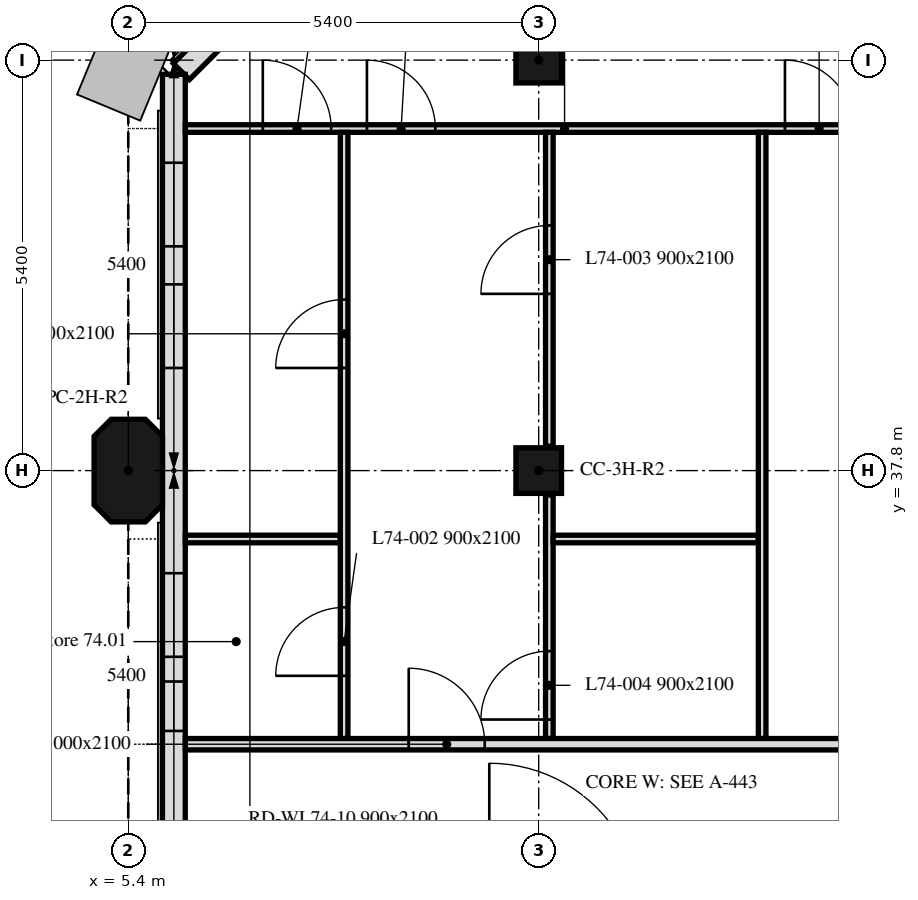
"""IFC4 building model, lengths in metres.
Left out: names, types, materials, properties, quantities, classifications, styles, units other than length and angle.
Written with IfcOpenShell. Run it as: python <this file> out.ifc"""

import sys

from ifc_helpers import new_model, si_unit, direction, frame, frame_2d, origin, origin_2d, place, context, subcontext, project, spatial, polyline, rectangle, outline, extrude, element, fill, save


model = new_model("IFC4")
c1 = context("Model", 3, precision=1e-05, world=origin(), true_north=direction((0.0, 1.0)))
c2 = subcontext(c1, "Body", "Model", "MODEL_VIEW")
j1 = project(units=[si_unit("LENGTHUNIT", "METRE"), si_unit("PLANEANGLEUNIT", "RADIAN")], contexts=[c1])
p1 = place(None, origin())
s1 = spatial("IfcSite", under=j1, at=p1, CompositionType="ELEMENT")
p2 = place(p1, origin())
s2 = spatial("IfcBuilding", under=s1, at=p2, CompositionType="ELEMENT")
p3 = place(p2, frame((0.0, 0.0, 298.3)))
s3 = spatial("IfcBuildingStorey", under=s2, at=p3, CompositionType="ELEMENT", Elevation=298.3)
p4 = place(p3, frame((5.4, 37.8, 0.0), z_axis=(0.0, 0.0, 1.0), x_axis=(0.0, 1.0, 0.0)))
e1 = element("IfcColumn", 1, at=p4, inside=s3, PredefinedType="COLUMN", context=c2, shape_type="SweptSolid", body=[
    extrude(outline(polyline([(-0.45, -0.45), (0.45, -0.45), (0.675, -0.225), (0.675, 0.225), (0.45, 0.45), (-0.45, 0.45), (-0.675, 0.225), (-0.675, -0.225), (-0.45, -0.45)])), origin(), (0.0, 0.0, 1.0), 3.0),
])
for number, where, z_axis, x_axis in (
    (2, (10.8, 37.8, 0.0), (0.0, 0.0, 1.0), (1.0, 0.0, 0.0)),
    (3, (10.8, 43.2, 0.0), (0.0, 0.0, 1.0), (1.0, 0.0, 0.0)),
):
    element("IfcColumn", number, at=place(p3, frame(where, z_axis=z_axis, x_axis=x_axis)), inside=s3, PredefinedType="COLUMN", context=c2, shape_type="SweptSolid", body=[
        extrude(rectangle(XDim=0.6, YDim=0.6, at=origin_2d()), origin(), (0.0, 0.0, 1.0), 3.0),
    ])
p5 = place(p3, frame((10.949, 47.901, 0.0), z_axis=(0.0, 0.0, 1.0), x_axis=(-0.707106781187, -0.707106781187, 0.0)))
e4 = element("IfcWall", 4, at=p5, inside=s3, PredefinedType="SOLIDWALL", context=c2, shape_type="SweptSolid", body=[
    extrude(rectangle(XDim=6.86, YDim=0.3, at=frame_2d((3.43, 0.0))), origin(), (0.0, 0.0, 1.0), 3.0),
])
p6 = place(p5, frame((1.28, 0.0, 0.9)))
e5 = element("IfcOpeningElement", 5, at=p6, cuts=e4, PredefinedType="OPENING", context=c2, shape_type="SweptSolid", body=[
    extrude(rectangle(XDim=1.1, YDim=1.7, at=frame_2d((0.55, 0.85))), frame((0.0, 0.16, 0.0), z_axis=(0.0, -1.0, 0.0), x_axis=(1.0, 0.0, 0.0)), (0.0, 0.0, 1.0), 0.32),
])
p7 = place(p5, frame((4.48, 0.0, 0.9)))
e6 = element("IfcOpeningElement", 6, at=p7, cuts=e4, PredefinedType="OPENING", context=c2, shape_type="SweptSolid", body=[
    extrude(rectangle(XDim=1.1, YDim=1.7, at=frame_2d((0.55, 0.85))), frame((0.0, 0.16, 0.0), z_axis=(0.0, -1.0, 0.0), x_axis=(1.0, 0.0, 0.0)), (0.0, 0.0, 1.0), 0.32),
])
p8 = place(p3, frame((6.0, 43.014, 0.0), z_axis=(0.0, 0.0, 1.0), x_axis=(0.0, -1.0, 0.0)))
e7 = element("IfcWall", 7, at=p8, inside=s3, PredefinedType="SOLIDWALL", context=c2, shape_type="SweptSolid", body=[
    extrude(rectangle(XDim=10.614, YDim=0.3, at=frame_2d((5.307, 0.0))), origin(), (0.0, 0.0, 1.0), 3.0),
])
p9 = place(p8, frame((1.164, 0.0, 0.9)))
e8 = element("IfcOpeningElement", 8, at=p9, cuts=e7, PredefinedType="OPENING", context=c2, shape_type="SweptSolid", body=[
    extrude(rectangle(XDim=1.1, YDim=1.7, at=frame_2d((0.55, 0.85))), frame((0.0, 0.16, 0.0), z_axis=(0.0, -1.0, 0.0), x_axis=(1.0, 0.0, 0.0)), (0.0, 0.0, 1.0), 0.32),
])
p10 = place(p8, frame((2.764, 0.0, 0.9)))
e9 = element("IfcOpeningElement", 9, at=p10, cuts=e7, PredefinedType="OPENING", context=c2, shape_type="SweptSolid", body=[
    extrude(rectangle(XDim=1.1, YDim=1.7, at=frame_2d((0.55, 0.85))), frame((0.0, 0.16, 0.0), z_axis=(0.0, -1.0, 0.0), x_axis=(1.0, 0.0, 0.0)), (0.0, 0.0, 1.0), 0.32),
])
p11 = place(p8, frame((6.564, 0.0, 0.9)))
e10 = element("IfcOpeningElement", 10, at=p11, cuts=e7, PredefinedType="OPENING", context=c2, shape_type="SweptSolid", body=[
    extrude(rectangle(XDim=1.1, YDim=1.7, at=frame_2d((0.55, 0.85))), frame((0.0, 0.16, 0.0), z_axis=(0.0, -1.0, 0.0), x_axis=(1.0, 0.0, 0.0)), (0.0, 0.0, 1.0), 0.32),
])
p12 = place(p8, frame((7.989, 0.0, 0.9)))
e11 = element("IfcOpeningElement", 11, at=p12, cuts=e7, PredefinedType="OPENING", context=c2, shape_type="SweptSolid", body=[
    extrude(rectangle(XDim=0.65, YDim=1.7, at=frame_2d((0.325, 0.85))), frame((0.0, 0.16, 0.0), z_axis=(0.0, -1.0, 0.0), x_axis=(1.0, 0.0, 0.0)), (0.0, 0.0, 1.0), 0.32),
])
p13 = place(p3, frame((6.151, 42.3, 0.0), z_axis=(0.0, 0.0, 1.0), x_axis=(1.0, 0.0, 0.0)))
e12 = element("IfcWall", 12, at=p13, inside=s3, PredefinedType="PARTITIONING", context=c2, shape_type="SweptSolid", body=[
    extrude(rectangle(XDim=9.979, YDim=0.1, at=frame_2d((4.99, 0.0))), origin(), (0.0, 0.0, 1.0), 3.0),
])
p14 = place(p13, frame((7.889, 0.0, 0.0)))
e13 = element("IfcOpeningElement", 13, at=p14, cuts=e12, PredefinedType="OPENING", context=c2, shape_type="SweptSolid", body=[
    extrude(rectangle(XDim=0.9, YDim=2.1, at=frame_2d((0.45, 1.05))), frame((0.0, 0.05, 0.0), z_axis=(0.0, -1.0, 0.0), x_axis=(1.0, 0.0, 0.0)), (0.0, 0.0, 1.0), 0.1),
])
p15 = place(p13, frame((1.019, 0.0, 0.0)))
e14 = element("IfcOpeningElement", 14, at=p15, cuts=e12, PredefinedType="OPENING", context=c2, shape_type="SweptSolid", body=[
    extrude(rectangle(XDim=0.9, YDim=2.1, at=frame_2d((0.45, 1.05))), frame((0.0, 0.05, 0.0), z_axis=(0.0, -1.0, 0.0), x_axis=(1.0, 0.0, 0.0)), (0.0, 0.0, 1.0), 0.1),
])
p16 = place(p13, frame((2.389, 0.0, 0.0)))
e15 = element("IfcOpeningElement", 15, at=p16, cuts=e12, PredefinedType="OPENING", context=c2, shape_type="SweptSolid", body=[
    extrude(rectangle(XDim=0.9, YDim=2.1, at=frame_2d((0.45, 1.05))), frame((0.0, 0.05, 0.0), z_axis=(0.0, -1.0, 0.0), x_axis=(1.0, 0.0, 0.0)), (0.0, 0.0, 1.0), 0.1),
])
p17 = place(p3, frame((6.151, 36.9, 0.0), z_axis=(0.0, 0.0, 1.0), x_axis=(1.0, 0.0, 0.0)))
e16 = element("IfcWall", 16, at=p17, inside=s3, PredefinedType="PARTITIONING", context=c2, shape_type="SweptSolid", body=[
    extrude(rectangle(XDim=2.039, YDim=0.1, at=frame_2d((1.02, 0.0))), origin(), (0.0, 0.0, 1.0), 3.0),
])
p18 = place(p3, frame((8.24, 34.275, 0.0), z_axis=(0.0, 0.0, 1.0), x_axis=(0.0, 1.0, 0.0)))
e17 = element("IfcWall", 17, at=p18, inside=s3, PredefinedType="PARTITIONING", context=c2, shape_type="SweptSolid", body=[
    extrude(rectangle(XDim=7.975, YDim=0.1, at=frame_2d((3.988, 0.0))), origin(), (0.0, 0.0, 1.0), 3.0),
])
p19 = place(p18, frame((0.825, 0.0, 0.0)))
e18 = element("IfcOpeningElement", 18, at=p19, cuts=e17, PredefinedType="OPENING", context=c2, shape_type="SweptSolid", body=[
    extrude(rectangle(XDim=0.9, YDim=2.1, at=frame_2d((0.45, 1.05))), frame((0.0, 0.05, 0.0), z_axis=(0.0, -1.0, 0.0), x_axis=(1.0, 0.0, 0.0)), (0.0, 0.0, 1.0), 0.1),
])
p20 = place(p18, frame((4.875, 0.0, 0.0)))
e19 = element("IfcOpeningElement", 19, at=p20, cuts=e17, PredefinedType="OPENING", context=c2, shape_type="SweptSolid", body=[
    extrude(rectangle(XDim=0.9, YDim=2.1, at=frame_2d((0.45, 1.05))), frame((0.0, 0.05, 0.0), z_axis=(0.0, -1.0, 0.0), x_axis=(1.0, 0.0, 0.0)), (0.0, 0.0, 1.0), 0.1),
])
p21 = place(p3, frame((10.94, 34.275, 0.0), z_axis=(0.0, 0.0, 1.0), x_axis=(0.0, 1.0, 0.0)))
e20 = element("IfcWall", 20, at=p21, inside=s3, PredefinedType="PARTITIONING", context=c2, shape_type="SweptSolid", body=[
    extrude(rectangle(XDim=3.205, YDim=0.1, at=frame_2d((1.603, 0.0))), origin(), (0.0, 0.0, 1.0), 3.0),
])
p22 = place(p21, frame((0.25, 0.0, 0.0)))
e21 = element("IfcOpeningElement", 21, at=p22, cuts=e20, PredefinedType="OPENING", context=c2, shape_type="SweptSolid", body=[
    extrude(rectangle(XDim=0.9, YDim=2.1, at=frame_2d((0.45, 1.05))), frame((0.0, 0.05, 0.0), z_axis=(0.0, -1.0, 0.0), x_axis=(1.0, 0.0, 0.0)), (0.0, 0.0, 1.0), 0.1),
])
p23 = place(p3, frame((10.94, 38.12, 0.0), z_axis=(0.0, 0.0, 1.0), x_axis=(0.0, 1.0, 0.0)))
e22 = element("IfcWall", 22, at=p23, inside=s3, PredefinedType="PARTITIONING", context=c2, shape_type="SweptSolid", body=[
    extrude(rectangle(XDim=4.13, YDim=0.1, at=frame_2d((2.065, 0.0))), origin(), (0.0, 0.0, 1.0), 3.0),
])
p24 = place(p23, frame((2.005, 0.0, 0.0)))
e23 = element("IfcOpeningElement", 23, at=p24, cuts=e22, PredefinedType="OPENING", context=c2, shape_type="SweptSolid", body=[
    extrude(rectangle(XDim=0.9, YDim=2.1, at=frame_2d((0.45, 1.05))), frame((0.0, 0.05, 0.0), z_axis=(0.0, -1.0, 0.0), x_axis=(1.0, 0.0, 0.0)), (0.0, 0.0, 1.0), 0.1),
])
p25 = place(p3, frame((10.99, 36.9, 0.0), z_axis=(0.0, 0.0, 1.0), x_axis=(1.0, 0.0, 0.0)))
e24 = element("IfcWall", 24, at=p25, inside=s3, PredefinedType="PARTITIONING", context=c2, shape_type="SweptSolid", body=[
    extrude(rectangle(XDim=2.7, YDim=0.1, at=frame_2d((1.35, 0.0))), origin(), (0.0, 0.0, 1.0), 3.0),
])
p26 = place(p3, frame((13.74, 34.275, 0.0), z_axis=(0.0, 0.0, 1.0), x_axis=(0.0, 1.0, 0.0)))
e25 = element("IfcWall", 25, at=p26, inside=s3, PredefinedType="PARTITIONING", context=c2, shape_type="SweptSolid", body=[
    extrude(rectangle(XDim=7.975, YDim=0.1, at=frame_2d((3.988, 0.0))), origin(), (0.0, 0.0, 1.0), 3.0),
])
p27 = place(p3, frame((6.151, 34.2, 0.0), z_axis=(0.0, 0.0, 1.0), x_axis=(1.0, 0.0, 0.0)))
e26 = element("IfcWall", 26, at=p27, inside=s3, PredefinedType="PARTITIONING", context=c2, shape_type="SweptSolid", body=[
    extrude(rectangle(XDim=41.698, YDim=0.15, at=frame_2d((20.849, 0.0))), origin(), (0.0, 0.0, 1.0), 2.4),
])
p28 = place(p27, frame((2.939, 0.0, 0.0)))
e27 = element("IfcOpeningElement", 27, at=p28, cuts=e26, PredefinedType="OPENING", context=c2, shape_type="SweptSolid", body=[
    extrude(rectangle(XDim=1.0, YDim=2.1, at=frame_2d((0.5, 1.05))), frame((0.0, 0.075, 0.0), z_axis=(0.0, -1.0, 0.0), x_axis=(1.0, 0.0, 0.0)), (0.0, 0.0, 1.0), 0.15),
])
p29 = place(p27, frame((18.121, 0.0, 0.0)))
e28 = element("IfcOpeningElement", 28, at=p29, cuts=e26, PredefinedType="OPENING", context=c2, shape_type="SweptSolid", body=[
    extrude(rectangle(XDim=1.0, YDim=2.1, at=frame_2d((0.5, 1.05))), frame((0.0, 0.075, 0.0), z_axis=(0.0, -1.0, 0.0), x_axis=(1.0, 0.0, 0.0)), (0.0, 0.0, 1.0), 0.15),
])
p30 = place(p27, frame((32.359, 0.0, 0.0)))
e29 = element("IfcOpeningElement", 29, at=p30, cuts=e26, PredefinedType="OPENING", context=c2, shape_type="SweptSolid", body=[
    extrude(rectangle(XDim=1.0, YDim=2.1, at=frame_2d((0.5, 1.05))), frame((0.0, 0.075, 0.0), z_axis=(0.0, -1.0, 0.0), x_axis=(1.0, 0.0, 0.0)), (0.0, 0.0, 1.0), 0.15),
])
p31 = place(p9, origin())
e30 = element("IfcWindow", 30, at=p31, inside=s3, PartitioningType="SINGLE_PANEL", PredefinedType="WINDOW", context=c2, shape_type="SweptSolid", body=[
    extrude(rectangle(XDim=1.1, YDim=1.7, at=frame_2d((0.55, 0.85))), frame((0.0, 0.03, 0.0), z_axis=(0.0, -1.0, 0.0), x_axis=(1.0, 0.0, 0.0)), (0.0, 0.0, 1.0), 0.06),
])
fill(e8, e30)
p32 = place(p10, origin())
e31 = element("IfcWindow", 31, at=p32, inside=s3, PartitioningType="SINGLE_PANEL", PredefinedType="WINDOW", context=c2, shape_type="SweptSolid", body=[
    extrude(rectangle(XDim=1.1, YDim=1.7, at=frame_2d((0.55, 0.85))), frame((0.0, 0.03, 0.0), z_axis=(0.0, -1.0, 0.0), x_axis=(1.0, 0.0, 0.0)), (0.0, 0.0, 1.0), 0.06),
])
fill(e9, e31)
p33 = place(p11, origin())
e32 = element("IfcWindow", 32, at=p33, inside=s3, PartitioningType="SINGLE_PANEL", PredefinedType="WINDOW", context=c2, shape_type="SweptSolid", body=[
    extrude(rectangle(XDim=1.1, YDim=1.7, at=frame_2d((0.55, 0.85))), frame((0.0, 0.03, 0.0), z_axis=(0.0, -1.0, 0.0), x_axis=(1.0, 0.0, 0.0)), (0.0, 0.0, 1.0), 0.06),
])
fill(e10, e32)
p34 = place(p12, origin())
e33 = element("IfcWindow", 33, at=p34, inside=s3, PartitioningType="SINGLE_PANEL", PredefinedType="WINDOW", context=c2, shape_type="SweptSolid", body=[
    extrude(rectangle(XDim=0.65, YDim=1.7, at=frame_2d((0.325, 0.85))), frame((0.0, 0.03, 0.0), z_axis=(0.0, -1.0, 0.0), x_axis=(1.0, 0.0, 0.0)), (0.0, 0.0, 1.0), 0.06),
])
fill(e11, e33)
p35 = place(p14, origin())
e34 = element("IfcDoor", 34, at=p35, inside=s3, OperationType="SINGLE_SWING_LEFT", PredefinedType="DOOR", context=c2, shape_type="SweptSolid", body=[
    extrude(rectangle(XDim=0.9, YDim=2.1, at=frame_2d((0.45, 1.05))), frame((0.0, 0.025, 0.0), z_axis=(0.0, -1.0, 0.0), x_axis=(1.0, 0.0, 0.0)), (0.0, 0.0, 1.0), 0.05),
])
fill(e13, e34)
p36 = place(p19, origin())
e35 = element("IfcDoor", 35, at=p36, inside=s3, OperationType="SINGLE_SWING_LEFT", PredefinedType="DOOR", context=c2, shape_type="SweptSolid", body=[
    extrude(rectangle(XDim=0.9, YDim=2.1, at=frame_2d((0.45, 1.05))), frame((0.0, 0.025, 0.0), z_axis=(0.0, -1.0, 0.0), x_axis=(1.0, 0.0, 0.0)), (0.0, 0.0, 1.0), 0.05),
])
fill(e18, e35)
p37 = place(p24, origin())
e36 = element("IfcDoor", 36, at=p37, inside=s3, OperationType="SINGLE_SWING_RIGHT", PredefinedType="DOOR", context=c2, shape_type="SweptSolid", body=[
    extrude(rectangle(XDim=0.9, YDim=2.1, at=frame_2d((0.45, 1.05))), frame((0.0, 0.025, 0.0), z_axis=(0.0, -1.0, 0.0), x_axis=(1.0, 0.0, 0.0)), (0.0, 0.0, 1.0), 0.05),
])
fill(e23, e36)
p38 = place(p22, origin())
e37 = element("IfcDoor", 37, at=p38, inside=s3, OperationType="SINGLE_SWING_RIGHT", PredefinedType="DOOR", context=c2, shape_type="SweptSolid", body=[
    extrude(rectangle(XDim=0.9, YDim=2.1, at=frame_2d((0.45, 1.05))), frame((0.0, 0.025, 0.0), z_axis=(0.0, -1.0, 0.0), x_axis=(1.0, 0.0, 0.0)), (0.0, 0.0, 1.0), 0.05),
])
fill(e21, e37)
p39 = place(p15, origin())
e38 = element("IfcDoor", 38, at=p39, inside=s3, OperationType="SINGLE_SWING_RIGHT", PredefinedType="DOOR", context=c2, shape_type="SweptSolid", body=[
    extrude(rectangle(XDim=0.9, YDim=2.1, at=frame_2d((0.45, 1.05))), frame((0.0, 0.025, 0.0), z_axis=(0.0, -1.0, 0.0), x_axis=(1.0, 0.0, 0.0)), (0.0, 0.0, 1.0), 0.05),
])
fill(e14, e38)
p40 = place(p20, origin())
e39 = element("IfcDoor", 39, at=p40, inside=s3, OperationType="SINGLE_SWING_RIGHT", PredefinedType="DOOR", context=c2, shape_type="SweptSolid", body=[
    extrude(rectangle(XDim=0.9, YDim=2.1, at=frame_2d((0.45, 1.05))), frame((0.0, 0.025, 0.0), z_axis=(0.0, -1.0, 0.0), x_axis=(1.0, 0.0, 0.0)), (0.0, 0.0, 1.0), 0.05),
])
fill(e19, e39)
p41 = place(p16, origin())
e40 = element("IfcDoor", 40, at=p41, inside=s3, OperationType="SINGLE_SWING_LEFT", PredefinedType="DOOR", context=c2, shape_type="SweptSolid", body=[
    extrude(rectangle(XDim=0.9, YDim=2.1, at=frame_2d((0.45, 1.05))), frame((0.0, 0.025, 0.0), z_axis=(0.0, -1.0, 0.0), x_axis=(1.0, 0.0, 0.0)), (0.0, 0.0, 1.0), 0.05),
])
fill(e15, e40)
p42 = place(p28, origin())
e41 = element("IfcDoor", 41, at=p42, inside=s3, OperationType="SINGLE_SWING_LEFT", PredefinedType="DOOR", context=c2, shape_type="SweptSolid", body=[
    extrude(rectangle(XDim=1.0, YDim=2.1, at=frame_2d((0.5, 1.05))), frame((0.0, 0.025, 0.0), z_axis=(0.0, -1.0, 0.0), x_axis=(1.0, 0.0, 0.0)), (0.0, 0.0, 1.0), 0.05),
])
fill(e27, e41)
save(model, sys.argv[1])
